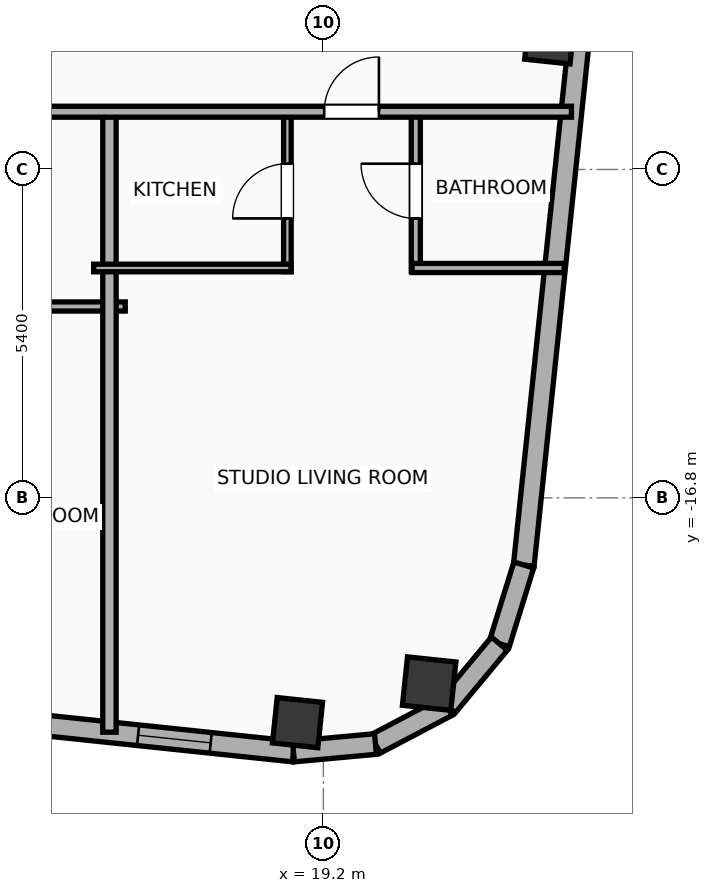
"""IFC4 building model, lengths in metres.
Left out: names, types, materials, properties, quantities, classifications, styles, units other than length and angle.
Written with IfcOpenShell. Run it as: python <this file> out.ifc"""

import sys

from ifc_helpers import new_model, si_unit, direction, frame, frame_2d, origin, origin_2d, place, context, subcontext, project, spatial, rectangle, hollow_rectangle, hollow_circle, extrude, element, fill, save


model = new_model("IFC4")
c1 = context("Model", 3, precision=1e-05, world=origin(), true_north=direction((0.0, 1.0)))
c2 = subcontext(c1, "Body", "Model", "MODEL_VIEW")
j1 = project(units=[si_unit("LENGTHUNIT", "METRE"), si_unit("PLANEANGLEUNIT", "RADIAN")], contexts=[c1])
p1 = place(None, origin())
s1 = spatial("IfcSite", under=j1, at=p1, CompositionType="ELEMENT")
p2 = place(p1, origin())
s2 = spatial("IfcBuilding", under=s1, at=p2, CompositionType="ELEMENT")
p3 = place(p2, frame((0.0, 0.0, 302.9)))
s3 = spatial("IfcBuildingStorey", under=s2, at=p3, CompositionType="ELEMENT", Elevation=302.9)
p4 = place(p3, frame((18.775, -20.497, 0.0), z_axis=(0.0, 0.0, 1.0), x_axis=(0.994521895368, -0.104528463268, 0.0)))
e1 = element("IfcColumn", 1, at=p4, inside=s3, PredefinedType="COLUMN", context=c2, shape_type="SweptSolid", body=[
    extrude(hollow_rectangle(XDim=0.75, YDim=0.75, WallThickness=0.025, at=origin_2d()), origin(), (0.0, 0.0, 1.0), 3.9),
])
p5 = place(p3, frame((20.939, -19.855, 0.0), z_axis=(0.0, 0.0, 1.0), x_axis=(0.994521895368, -0.104528463268, 0.0)))
e2 = element("IfcColumn", 2, at=p5, inside=s3, PredefinedType="COLUMN", context=c2, shape_type="SweptSolid", body=[
    extrude(hollow_circle(Radius=0.4, WallThickness=0.028, at=origin_2d()), origin(), (0.0, 0.0, 1.0), 3.9),
])
p6 = place(p3, frame((22.923, -9.252, 0.0), z_axis=(0.0, 0.0, 1.0), x_axis=(0.994521895368, -0.104528463268, 0.0)))
e3 = element("IfcColumn", 3, at=p6, inside=s3, PredefinedType="COLUMN", context=c2, shape_type="SweptSolid", body=[
    extrude(hollow_rectangle(XDim=0.75, YDim=0.75, WallThickness=0.025, at=origin_2d()), origin(), (0.0, 0.0, 1.0), 3.9),
])
p7 = place(p3, frame((18.708, -20.972, 0.0), z_axis=(0.0, 0.0, 1.0), x_axis=(-0.994521888554, 0.104528528102, 0.0)))
e4 = element("IfcWall", 4, at=p7, inside=s3, PredefinedType="ELEMENTEDWALL", context=c2, shape_type="SweptSolid", body=[
    extrude(rectangle(XDim=46.766, YDim=0.34, at=frame_2d((23.383, 0.0))), origin(), (0.0, 0.0, 1.0), 3.635),
])
p8 = place(p7, frame((23.733, 0.0, 0.65)))
e5 = element("IfcOpeningElement", 5, at=p8, cuts=e4, PredefinedType="OPENING", context=c2, shape_type="SweptSolid", body=[
    extrude(rectangle(XDim=2.6, YDim=2.45, at=frame_2d((1.3, 1.225))), frame((0.0, 0.18, 0.0), z_axis=(0.0, -1.0, 0.0), x_axis=(1.0, 0.0, 0.0)), (0.0, 0.0, 1.0), 0.36),
])
p9 = place(p7, frame((44.402, 0.0, 0.75)))
e6 = element("IfcOpeningElement", 6, at=p9, cuts=e4, PredefinedType="OPENING", context=c2, shape_type="SweptSolid", body=[
    extrude(rectangle(XDim=1.2, YDim=2.05, at=frame_2d((0.6, 1.025))), frame((0.0, 0.18, 0.0), z_axis=(0.0, -1.0, 0.0), x_axis=(1.0, 0.0, 0.0)), (0.0, 0.0, 1.0), 0.36),
])
p10 = place(p7, frame((39.54, 0.0, 0.75)))
e7 = element("IfcOpeningElement", 7, at=p10, cuts=e4, PredefinedType="OPENING", context=c2, shape_type="SweptSolid", body=[
    extrude(rectangle(XDim=1.2, YDim=2.05, at=frame_2d((0.6, 1.025))), frame((0.0, 0.18, 0.0), z_axis=(0.0, -1.0, 0.0), x_axis=(1.0, 0.0, 0.0)), (0.0, 0.0, 1.0), 0.36),
])
p11 = place(p7, frame((42.406, 0.0, 0.75)))
e8 = element("IfcOpeningElement", 8, at=p11, cuts=e4, PredefinedType="OPENING", context=c2, shape_type="SweptSolid", body=[
    extrude(rectangle(XDim=1.2, YDim=2.05, at=frame_2d((0.6, 1.025))), frame((0.0, 0.18, 0.0), z_axis=(0.0, -1.0, 0.0), x_axis=(1.0, 0.0, 0.0)), (0.0, 0.0, 1.0), 0.36),
])
p12 = place(p7, frame((34.933, 0.0, 0.75)))
e9 = element("IfcOpeningElement", 9, at=p12, cuts=e4, PredefinedType="OPENING", context=c2, shape_type="SweptSolid", body=[
    extrude(rectangle(XDim=1.2, YDim=2.05, at=frame_2d((0.6, 1.025))), frame((0.0, 0.18, 0.0), z_axis=(0.0, -1.0, 0.0), x_axis=(1.0, 0.0, 0.0)), (0.0, 0.0, 1.0), 0.36),
])
p13 = place(p7, frame((28.631, 0.0, 0.75)))
e10 = element("IfcOpeningElement", 10, at=p13, cuts=e4, PredefinedType="OPENING", context=c2, shape_type="SweptSolid", body=[
    extrude(rectangle(XDim=1.2, YDim=2.05, at=frame_2d((0.6, 1.025))), frame((0.0, 0.18, 0.0), z_axis=(0.0, -1.0, 0.0), x_axis=(1.0, 0.0, 0.0)), (0.0, 0.0, 1.0), 0.36),
])
p14 = place(p7, frame((30.896, 0.0, 0.75)))
e11 = element("IfcOpeningElement", 11, at=p14, cuts=e4, PredefinedType="OPENING", context=c2, shape_type="SweptSolid", body=[
    extrude(rectangle(XDim=1.2, YDim=2.05, at=frame_2d((0.6, 1.025))), frame((0.0, 0.18, 0.0), z_axis=(0.0, -1.0, 0.0), x_axis=(1.0, 0.0, 0.0)), (0.0, 0.0, 1.0), 0.36),
])
p15 = place(p7, frame((7.501, 0.0, 0.75)))
e12 = element("IfcOpeningElement", 12, at=p15, cuts=e4, PredefinedType="OPENING", context=c2, shape_type="SweptSolid", body=[
    extrude(rectangle(XDim=1.2, YDim=2.05, at=frame_2d((0.6, 1.025))), frame((0.0, 0.18, 0.0), z_axis=(0.0, -1.0, 0.0), x_axis=(1.0, 0.0, 0.0)), (0.0, 0.0, 1.0), 0.36),
])
p16 = place(p7, frame((4.159, 0.0, 0.75)))
e13 = element("IfcOpeningElement", 13, at=p16, cuts=e4, PredefinedType="OPENING", context=c2, shape_type="SweptSolid", body=[
    extrude(rectangle(XDim=1.2, YDim=2.05, at=frame_2d((0.6, 1.025))), frame((0.0, 0.18, 0.0), z_axis=(0.0, -1.0, 0.0), x_axis=(1.0, 0.0, 0.0)), (0.0, 0.0, 1.0), 0.36),
])
p17 = place(p7, frame((1.369, 0.0, 0.75)))
e14 = element("IfcOpeningElement", 14, at=p17, cuts=e4, PredefinedType="OPENING", context=c2, shape_type="SweptSolid", body=[
    extrude(rectangle(XDim=1.2, YDim=2.05, at=frame_2d((0.6, 1.025))), frame((0.0, 0.18, 0.0), z_axis=(0.0, -1.0, 0.0), x_axis=(1.0, 0.0, 0.0)), (0.0, 0.0, 1.0), 0.36),
])
p18 = place(p7, frame((20.254, 0.0, 0.75)))
e15 = element("IfcOpeningElement", 15, at=p18, cuts=e4, PredefinedType="OPENING", context=c2, shape_type="SweptSolid", body=[
    extrude(rectangle(XDim=1.2, YDim=2.05, at=frame_2d((0.6, 1.025))), frame((0.0, 0.18, 0.0), z_axis=(0.0, -1.0, 0.0), x_axis=(1.0, 0.0, 0.0)), (0.0, 0.0, 1.0), 0.36),
])
p19 = place(p7, frame((16.172, 0.0, 0.75)))
e16 = element("IfcOpeningElement", 16, at=p19, cuts=e4, PredefinedType="OPENING", context=c2, shape_type="SweptSolid", body=[
    extrude(rectangle(XDim=1.2, YDim=2.05, at=frame_2d((0.6, 1.025))), frame((0.0, 0.18, 0.0), z_axis=(0.0, -1.0, 0.0), x_axis=(1.0, 0.0, 0.0)), (0.0, 0.0, 1.0), 0.36),
])
p20 = place(p7, frame((12.11, 0.0, 0.75)))
e17 = element("IfcOpeningElement", 17, at=p20, cuts=e4, PredefinedType="OPENING", context=c2, shape_type="SweptSolid", body=[
    extrude(rectangle(XDim=1.2, YDim=2.05, at=frame_2d((0.6, 1.025))), frame((0.0, 0.18, 0.0), z_axis=(0.0, -1.0, 0.0), x_axis=(1.0, 0.0, 0.0)), (0.0, 0.0, 1.0), 0.36),
])
p21 = place(p3, frame((25.67, 12.296, 0.0), z_axis=(0.0, 0.0, 1.0), x_axis=(-0.104533282919, -0.994521388791, 0.0)))
e18 = element("IfcWall", 18, at=p21, inside=s3, PredefinedType="ELEMENTEDWALL", context=c2, shape_type="SweptSolid", body=[
    extrude(rectangle(XDim=30.366, YDim=0.34, at=frame_2d((15.183, 0.0))), origin(), (0.0, 0.0, 1.0), 3.635),
])
p22 = place(p21, frame((5.442, 0.0, 0.65)))
e19 = element("IfcOpeningElement", 19, at=p22, cuts=e18, PredefinedType="OPENING", context=c2, shape_type="SweptSolid", body=[
    extrude(rectangle(XDim=2.6, YDim=2.45, at=frame_2d((1.3, 1.225))), frame((0.0, 0.18, 0.0), z_axis=(0.0, -1.0, 0.0), x_axis=(1.0, 0.0, 0.0)), (0.0, 0.0, 1.0), 0.36),
])
p23 = place(p21, frame((18.005, 0.0, 0.75)))
e20 = element("IfcOpeningElement", 20, at=p23, cuts=e18, PredefinedType="OPENING", context=c2, shape_type="SweptSolid", body=[
    extrude(rectangle(XDim=1.2, YDim=2.05, at=frame_2d((0.6, 1.025))), frame((0.0, 0.18, 0.0), z_axis=(0.0, -1.0, 0.0), x_axis=(1.0, 0.0, 0.0)), (0.0, 0.0, 1.0), 0.36),
])
p24 = place(p3, frame((22.496, -17.905, 0.0), z_axis=(0.0, 0.0, 1.0), x_axis=(-0.296416228123, -0.955058856671, 0.0)))
e21 = element("IfcWall", 21, at=p24, inside=s3, PredefinedType="ELEMENTEDWALL", context=c2, shape_type="SweptSolid", body=[
    extrude(rectangle(XDim=1.354, YDim=0.34, at=frame_2d((0.677, 0.0))), origin(), (0.0, 0.0, 1.0), 3.635),
])
p25 = place(p3, frame((22.094, -19.198, 0.0), z_axis=(0.0, 0.0, 1.0), x_axis=(-0.639501603217, -0.768789762863, 0.0)))
e22 = element("IfcWall", 22, at=p25, inside=s3, PredefinedType="ELEMENTEDWALL", context=c2, shape_type="SweptSolid", body=[
    extrude(rectangle(XDim=1.337, YDim=0.34, at=frame_2d((0.668, 0.0))), origin(), (0.0, 0.0, 1.0), 3.635),
])
p26 = place(p3, frame((21.24, -20.226, 0.0), z_axis=(0.0, 0.0, 1.0), x_axis=(-0.884922182678, -0.465738908193, 0.0)))
e23 = element("IfcWall", 23, at=p26, inside=s3, PredefinedType="ELEMENTEDWALL", context=c2, shape_type="SweptSolid", body=[
    extrude(rectangle(XDim=1.337, YDim=0.34, at=frame_2d((0.668, 0.0))), origin(), (0.0, 0.0, 1.0), 3.635),
])
p27 = place(p3, frame((20.056, -20.848, 0.0), z_axis=(0.0, 0.0, 1.0), x_axis=(-0.995813013343, -0.091413579172, 0.0)))
e24 = element("IfcWall", 24, at=p27, inside=s3, PredefinedType="ELEMENTEDWALL", context=c2, shape_type="SweptSolid", body=[
    extrude(rectangle(XDim=1.354, YDim=0.34, at=frame_2d((0.677, 0.0))), origin(), (0.0, 0.0, 1.0), 3.635),
])
p28 = place(p3, frame((12.152, -13.653, 0.0), z_axis=(0.0, 0.0, 1.0), x_axis=(1.0, 0.0, 0.0)))
e25 = element("IfcWall", 25, at=p28, inside=s3, PredefinedType="PLUMBINGWALL", context=c2, shape_type="SweptSolid", body=[
    extrude(rectangle(XDim=3.79, YDim=0.15, at=frame_2d((1.895, 0.0))), origin(), (0.0, 0.0, 1.0), 3.635),
])
p29 = place(p3, frame((15.682, -20.654, 0.0), z_axis=(0.0, 0.0, 1.0), x_axis=(0.0, 1.0, 0.0)))
e26 = element("IfcWall", 26, at=p29, inside=s3, PredefinedType="PARTITIONING", context=c2, shape_type="SweptSolid", body=[
    extrude(rectangle(XDim=10.284, YDim=0.22, at=frame_2d((5.142, 0.0))), origin(), (0.0, 0.0, 1.0), 3.635),
])
p30 = place(p3, frame((18.608, -13.08, 0.0), z_axis=(0.0, 0.0, 1.0), x_axis=(0.0, 1.0, 0.0)))
e27 = element("IfcWall", 27, at=p30, inside=s3, PredefinedType="PARTITIONING", context=c2, shape_type="SweptSolid", body=[
    extrude(rectangle(XDim=2.65, YDim=0.125, at=frame_2d((1.325, 0.0))), origin(), (0.0, 0.0, 1.0), 3.635),
])
p31 = place(p30, frame((0.875, 0.0, 0.0)))
e28 = element("IfcOpeningElement", 28, at=p31, cuts=e27, PredefinedType="OPENING", context=c2, shape_type="SweptSolid", body=[
    extrude(rectangle(XDim=0.9, YDim=2.05, at=frame_2d((0.45, 1.025))), frame((0.0, 0.073, 0.0), z_axis=(0.0, -1.0, 0.0), x_axis=(1.0, 0.0, 0.0)), (0.0, 0.0, 1.0), 0.145),
])
p32 = place(p3, frame((20.72, -13.08, 0.0), z_axis=(0.0, 0.0, 1.0), x_axis=(0.0, 1.0, 0.0)))
e29 = element("IfcWall", 29, at=p32, inside=s3, PredefinedType="PLUMBINGWALL", context=c2, shape_type="SweptSolid", body=[
    extrude(rectangle(XDim=2.65, YDim=0.15, at=frame_2d((1.325, 0.0))), origin(), (0.0, 0.0, 1.0), 3.635),
])
p33 = place(p32, frame((0.875, 0.0, 0.0)))
e30 = element("IfcOpeningElement", 30, at=p33, cuts=e29, PredefinedType="OPENING", context=c2, shape_type="SweptSolid", body=[
    extrude(rectangle(XDim=0.9, YDim=2.05, at=frame_2d((0.45, 1.025))), frame((0.0, 0.085, 0.0), z_axis=(0.0, -1.0, 0.0), x_axis=(1.0, 0.0, 0.0)), (0.0, 0.0, 1.0), 0.17),
])
p34 = place(p3, frame((15.422, -13.02, 0.0), z_axis=(0.0, 0.0, 1.0), x_axis=(1.0, 0.0, 0.0)))
e31 = element("IfcWall", 31, at=p34, inside=s3, PredefinedType="PARTITIONING", context=c2, shape_type="SweptSolid", body=[
    extrude(rectangle(XDim=3.246, YDim=0.125, at=frame_2d((1.623, 0.0))), origin(), (0.0, 0.0, 1.0), 3.635),
])
p35 = place(p3, frame((20.66, -13.02, 0.0), z_axis=(0.0, 0.0, 1.0), x_axis=(1.0, 0.0, 0.0)))
e32 = element("IfcWall", 32, at=p35, inside=s3, PredefinedType="PLUMBINGWALL", context=c2, shape_type="SweptSolid", body=[
    extrude(rectangle(XDim=2.5, YDim=0.15, at=frame_2d((1.25, 0.0))), origin(), (0.0, 0.0, 1.0), 3.635),
])
p36 = place(p3, frame((8.08, -10.45, 0.0), z_axis=(0.0, 0.0, 1.0), x_axis=(1.0, 0.0, 0.0)))
e33 = element("IfcWall", 33, at=p36, inside=s3, PredefinedType="PARTITIONING", context=c2, shape_type="SweptSolid", body=[
    extrude(rectangle(XDim=15.199, YDim=0.18, at=frame_2d((7.6, 0.0))), origin(), (0.0, 0.0, 1.0), 3.635),
])
p37 = place(p36, frame((3.39, 0.0, 0.0)))
e34 = element("IfcOpeningElement", 34, at=p37, cuts=e33, PredefinedType="OPENING", context=c2, shape_type="SweptSolid", body=[
    extrude(rectangle(XDim=1.15, YDim=2.05, at=frame_2d((0.575, 1.025))), frame((0.0, 0.1, 0.0), z_axis=(0.0, -1.0, 0.0), x_axis=(1.0, 0.0, 0.0)), (0.0, 0.0, 1.0), 0.2),
])
p38 = place(p36, frame((11.134, 0.0, 0.0)))
e35 = element("IfcOpeningElement", 35, at=p38, cuts=e33, PredefinedType="OPENING", context=c2, shape_type="SweptSolid", body=[
    extrude(rectangle(XDim=0.9, YDim=2.05, at=frame_2d((0.45, 1.025))), frame((0.0, 0.1, 0.0), z_axis=(0.0, -1.0, 0.0), x_axis=(1.0, 0.0, 0.0)), (0.0, 0.0, 1.0), 0.2),
])
p39 = place(p17, origin())
e36 = element("IfcWindow", 36, at=p39, inside=s3, PartitioningType="SINGLE_PANEL", PredefinedType="WINDOW", context=c2, shape_type="SweptSolid", body=[
    extrude(rectangle(XDim=1.2, YDim=2.05, at=frame_2d((0.6, 1.025))), frame((0.0, 0.03, 0.0), z_axis=(0.0, -1.0, 0.0), x_axis=(1.0, 0.0, 0.0)), (0.0, 0.0, 1.0), 0.06),
])
fill(e14, e36)
p40 = place(p31, origin())
e37 = element("IfcDoor", 37, at=p40, inside=s3, OperationType="SINGLE_SWING_LEFT", PredefinedType="DOOR", context=c2, shape_type="SweptSolid", body=[
    extrude(rectangle(XDim=0.9, YDim=2.05, at=frame_2d((0.45, 1.025))), frame((0.0, 0.025, 0.0), z_axis=(0.0, -1.0, 0.0), x_axis=(1.0, 0.0, 0.0)), (0.0, 0.0, 1.0), 0.05),
])
fill(e28, e37)
p41 = place(p33, origin())
e38 = element("IfcDoor", 38, at=p41, inside=s3, OperationType="SINGLE_SWING_RIGHT", PredefinedType="DOOR", context=c2, shape_type="SweptSolid", body=[
    extrude(rectangle(XDim=0.9, YDim=2.05, at=frame_2d((0.45, 1.025))), frame((0.0, 0.025, 0.0), z_axis=(0.0, -1.0, 0.0), x_axis=(1.0, 0.0, 0.0)), (0.0, 0.0, 1.0), 0.05),
])
fill(e30, e38)
p42 = place(p38, origin())
e39 = element("IfcDoor", 39, at=p42, inside=s3, OperationType="SINGLE_SWING_RIGHT", PredefinedType="DOOR", context=c2, shape_type="SweptSolid", body=[
    extrude(rectangle(XDim=0.9, YDim=2.05, at=frame_2d((0.45, 1.025))), frame((0.0, 0.025, 0.0), z_axis=(0.0, -1.0, 0.0), x_axis=(1.0, 0.0, 0.0)), (0.0, 0.0, 1.0), 0.05),
])
fill(e35, e39)
save(model, sys.argv[1])
